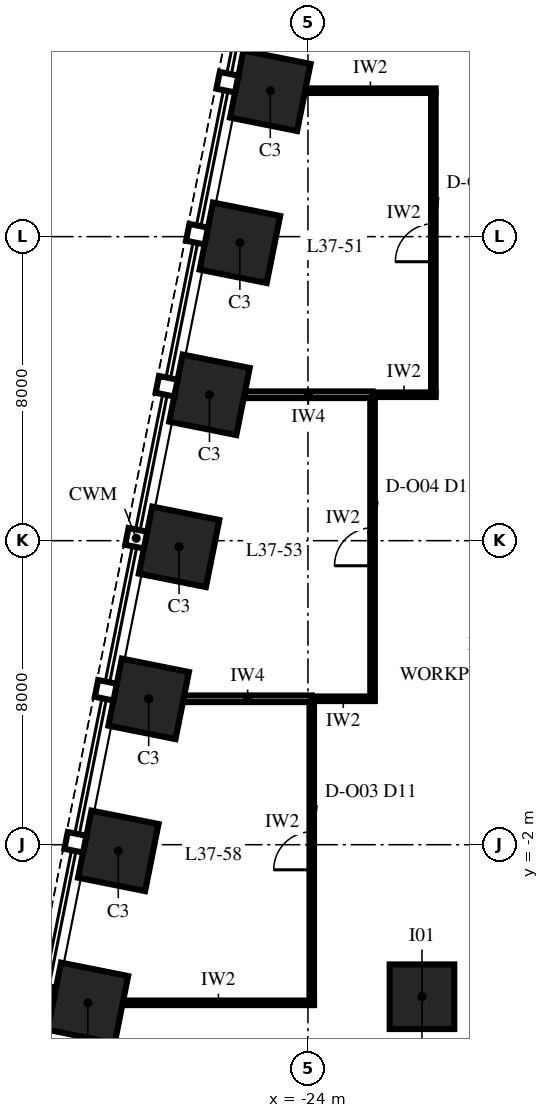
"""IFC4 building model, lengths in metres.
Left out: names, types, materials, properties, quantities, classifications, styles, units other than length and angle.
Written with IfcOpenShell. Run it as: python <this file> out.ifc"""

import sys

from ifc_helpers import new_model, si_unit, direction, frame, frame_2d, origin, origin_2d, place, context, subcontext, project, spatial, rectangle, extrude, element, fill, save


model = new_model("IFC4")
c1 = context("Model", 3, precision=1e-05, world=origin(), true_north=direction((0.0, 1.0)))
c2 = subcontext(c1, "Body", "Model", "MODEL_VIEW")
j1 = project(units=[si_unit("LENGTHUNIT", "METRE"), si_unit("PLANEANGLEUNIT", "RADIAN")], contexts=[c1])
p1 = place(None, origin())
s1 = spatial("IfcSite", under=j1, at=p1, CompositionType="ELEMENT")
p2 = place(p1, origin())
s2 = spatial("IfcBuilding", under=s1, at=p2, CompositionType="ELEMENT")
p3 = place(p2, frame((0.0, 0.0, 163.0)))
s3 = spatial("IfcBuildingStorey", under=s2, at=p3, CompositionType="ELEMENT", Elevation=163.0)
for number, where, z_axis, x_axis in (
    (1, (-24.991, 17.838, 0.0), (0.0, 0.0, 1.0), (-0.196, -0.981, 0.0)),
    (2, (-25.791, 13.838, 0.0), (0.0, 0.0, 1.0), (-0.196, -0.981, 0.0)),
    (3, (-26.591, 9.838, 0.0), (0.0, 0.0, 1.0), (-0.196, -0.981, 0.0)),
    (4, (-27.391, 5.838, 0.0), (0.0, 0.0, 1.0), (-0.196, -0.981, 0.0)),
    (5, (-28.191, 1.838, 0.0), (0.0, 0.0, 1.0), (-0.196, -0.981, 0.0)),
    (6, (-28.991, -2.162, 0.0), (0.0, 0.0, 1.0), (-0.196, -0.981, 0.0)),
    (7, (-29.791, -6.162, 0.0), (0.0, 0.0, 1.0), (-0.196, -0.981, 0.0)),
):
    element("IfcColumn", number, at=place(p3, frame(where, z_axis=z_axis, x_axis=x_axis)), inside=s3, PredefinedType="COLUMN", context=c2, shape_type="SweptSolid", body=[
        extrude(rectangle(XDim=1.8, YDim=1.8, at=origin_2d()), origin(), (0.0, 0.0, 1.0), 4.0),
    ])
p4 = place(p3, frame((-21.0, -6.0, 0.0), z_axis=(0.0, 0.0, 1.0), x_axis=(1.0, 0.0, 0.0)))
e8 = element("IfcColumn", 8, at=p4, inside=s3, PredefinedType="COLUMN", context=c2, shape_type="SweptSolid", body=[
    extrude(rectangle(XDim=1.7, YDim=1.7, at=origin_2d()), origin(), (0.0, 0.0, 1.0), 4.0),
])
p5 = place(p3, frame((-28.873, -6.16, 0.0), z_axis=(0.0, 0.0, 1.0), x_axis=(1.0, 0.0, 0.0)))
e9 = element("IfcWall", 9, at=p5, inside=s3, PredefinedType="PARTITIONING", context=c2, shape_type="SweptSolid", body=[
    extrude(rectangle(XDim=5.033, YDim=0.12, at=frame_2d((2.516, 0.0))), origin(), (0.0, 0.0, 1.0), 2.742),
])
p6 = place(p3, frame((-27.273, 1.84, 0.0), z_axis=(0.0, 0.0, 1.0), x_axis=(1.0, 0.0, 0.0)))
e10 = element("IfcWall", 10, at=p6, inside=s3, PredefinedType="PARTITIONING", context=c2, shape_type="SweptSolid", body=[
    extrude(rectangle(XDim=3.373, YDim=0.175, at=frame_2d((1.687, 0.0))), origin(), (0.0, 0.0, 1.0), 3.13),
])
p7 = place(p3, frame((-23.9, 1.84, 0.0), z_axis=(0.0, 0.0, 1.0), x_axis=(1.0, 0.0, 0.0)))
e11 = element("IfcWall", 11, at=p7, inside=s3, PredefinedType="PARTITIONING", context=c2, shape_type="SweptSolid", body=[
    extrude(rectangle(XDim=1.66, YDim=0.12, at=frame_2d((0.83, 0.0))), origin(), (0.0, 0.0, 1.0), 3.75),
])
p8 = place(p3, frame((-25.673, 9.84, 0.0), z_axis=(0.0, 0.0, 1.0), x_axis=(1.0, 0.0, 0.0)))
e12 = element("IfcWall", 12, at=p8, inside=s3, PredefinedType="PARTITIONING", context=c2, shape_type="SweptSolid", body=[
    extrude(rectangle(XDim=3.373, YDim=0.175, at=frame_2d((1.687, 0.0))), origin(), (0.0, 0.0, 1.0), 3.13),
])
p9 = place(p3, frame((-22.3, 9.84, 0.0), z_axis=(0.0, 0.0, 1.0), x_axis=(1.0, 0.0, 0.0)))
e13 = element("IfcWall", 13, at=p9, inside=s3, PredefinedType="PARTITIONING", context=c2, shape_type="SweptSolid", body=[
    extrude(rectangle(XDim=1.66, YDim=0.12, at=frame_2d((0.83, 0.0))), origin(), (0.0, 0.0, 1.0), 3.75),
])
p10 = place(p3, frame((-24.073, 17.84, 0.0), z_axis=(0.0, 0.0, 1.0), x_axis=(1.0, 0.0, 0.0)))
e14 = element("IfcWall", 14, at=p10, inside=s3, PredefinedType="PARTITIONING", context=c2, shape_type="SweptSolid", body=[
    extrude(rectangle(XDim=3.433, YDim=0.12, at=frame_2d((1.716, 0.0))), origin(), (0.0, 0.0, 1.0), 3.13),
])
p11 = place(p3, frame((-23.9, -6.1, 0.0), z_axis=(0.0, 0.0, 1.0), x_axis=(0.0, 1.0, 0.0)))
e15 = element("IfcWall", 15, at=p11, inside=s3, PredefinedType="PARTITIONING", context=c2, shape_type="SweptSolid", body=[
    extrude(rectangle(XDim=7.853, YDim=0.12, at=frame_2d((3.926, 0.0))), origin(), (0.0, 0.0, 1.0), 2.742),
])
p12 = place(p11, frame((3.44, 0.0, 0.0)))
e16 = element("IfcOpeningElement", 16, at=p12, cuts=e15, PredefinedType="OPENING", context=c2, shape_type="SweptSolid", body=[
    extrude(rectangle(XDim=1.0, YDim=2.4, at=frame_2d((0.5, 1.2))), frame((0.0, 0.075, 0.0), z_axis=(0.0, -1.0, 0.0), x_axis=(1.0, 0.0, 0.0)), (0.0, 0.0, 1.0), 0.15),
])
p13 = place(p3, frame((-22.3, 1.9, 0.0), z_axis=(0.0, 0.0, 1.0), x_axis=(0.0, 1.0, 0.0)))
e17 = element("IfcWall", 17, at=p13, inside=s3, PredefinedType="PARTITIONING", context=c2, shape_type="SweptSolid", body=[
    extrude(rectangle(XDim=7.853, YDim=0.12, at=frame_2d((3.926, 0.0))), origin(), (0.0, 0.0, 1.0), 2.742),
])
p14 = place(p13, frame((3.44, 0.0, 0.0)))
e18 = element("IfcOpeningElement", 18, at=p14, cuts=e17, PredefinedType="OPENING", context=c2, shape_type="SweptSolid", body=[
    extrude(rectangle(XDim=1.0, YDim=2.4, at=frame_2d((0.5, 1.2))), frame((0.0, 0.075, 0.0), z_axis=(0.0, -1.0, 0.0), x_axis=(1.0, 0.0, 0.0)), (0.0, 0.0, 1.0), 0.15),
])
p15 = place(p3, frame((-20.7, 9.9, 0.0), z_axis=(0.0, 0.0, 1.0), x_axis=(0.0, 1.0, 0.0)))
e19 = element("IfcWall", 19, at=p15, inside=s3, PredefinedType="PARTITIONING", context=c2, shape_type="SweptSolid", body=[
    extrude(rectangle(XDim=7.88, YDim=0.12, at=frame_2d((3.94, 0.0))), origin(), (0.0, 0.0, 1.0), 3.13),
])
p16 = place(p15, frame((3.44, 0.0, 0.0)))
e20 = element("IfcOpeningElement", 20, at=p16, cuts=e19, PredefinedType="OPENING", context=c2, shape_type="SweptSolid", body=[
    extrude(rectangle(XDim=1.0, YDim=2.4, at=frame_2d((0.5, 1.2))), frame((0.0, 0.075, 0.0), z_axis=(0.0, -1.0, 0.0), x_axis=(1.0, 0.0, 0.0)), (0.0, 0.0, 1.0), 0.15),
])
p17 = place(p12, origin())
e21 = element("IfcDoor", 21, at=p17, inside=s3, OperationType="SINGLE_SWING_RIGHT", PredefinedType="DOOR", context=c2, shape_type="SweptSolid", body=[
    extrude(rectangle(XDim=1.0, YDim=2.4, at=frame_2d((0.5, 1.2))), frame((0.0, 0.06, 0.0), z_axis=(0.0, -1.0, 0.0), x_axis=(1.0, 0.0, 0.0)), (0.0, 0.0, 1.0), 0.12),
])
fill(e16, e21)
p18 = place(p14, origin())
e22 = element("IfcDoor", 22, at=p18, inside=s3, OperationType="SINGLE_SWING_RIGHT", PredefinedType="DOOR", context=c2, shape_type="SweptSolid", body=[
    extrude(rectangle(XDim=1.0, YDim=2.4, at=frame_2d((0.5, 1.2))), frame((0.0, 0.06, 0.0), z_axis=(0.0, -1.0, 0.0), x_axis=(1.0, 0.0, 0.0)), (0.0, 0.0, 1.0), 0.12),
])
fill(e18, e22)
p19 = place(p16, origin())
e23 = element("IfcDoor", 23, at=p19, inside=s3, OperationType="SINGLE_SWING_RIGHT", PredefinedType="DOOR", context=c2, shape_type="SweptSolid", body=[
    extrude(rectangle(XDim=1.0, YDim=2.4, at=frame_2d((0.5, 1.2))), frame((0.0, 0.06, 0.0), z_axis=(0.0, -1.0, 0.0), x_axis=(1.0, 0.0, 0.0)), (0.0, 0.0, 1.0), 0.12),
])
fill(e20, e23)
save(model, sys.argv[1])
